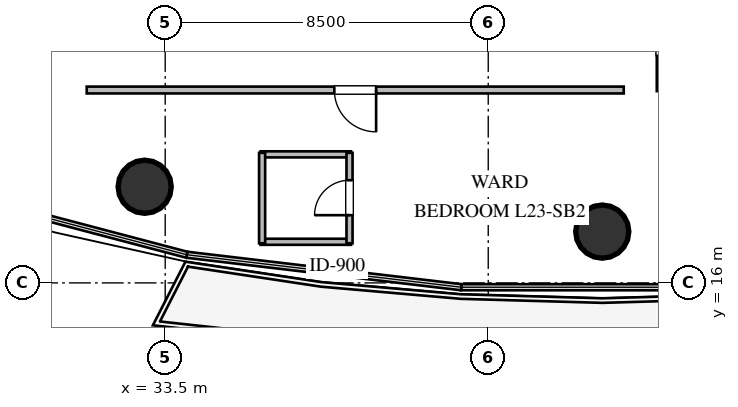
"""IFC4 building model, lengths in metres.
Left out: names, types, materials, properties, quantities, classifications, styles, units other than length and angle.
Written with IfcOpenShell. Run it as: python <this file> out.ifc"""

import sys

from ifc_helpers import new_model, si_unit, direction, frame, frame_2d, origin, origin_2d, place, context, subcontext, project, spatial, rectangle, circle, extrude, element, fill, save


model = new_model("IFC4")
c1 = context("Model", 3, precision=1e-05, world=origin(), true_north=direction((0.0, 1.0)))
c2 = subcontext(c1, "Body", "Model", "MODEL_VIEW")
j1 = project(units=[si_unit("LENGTHUNIT", "METRE"), si_unit("PLANEANGLEUNIT", "RADIAN")], contexts=[c1])
p1 = place(None, origin())
s1 = spatial("IfcSite", under=j1, at=p1, CompositionType="ELEMENT")
p2 = place(p1, origin())
s2 = spatial("IfcBuilding", under=s1, at=p2, CompositionType="ELEMENT")
p3 = place(p2, frame((0.0, 0.0, 88.8)))
s3 = spatial("IfcBuildingStorey", under=s2, at=p3, CompositionType="ELEMENT", Elevation=88.8)
for number, where, z_axis, x_axis in (
    (1, (32.96, 18.53, 0.0), (0.0, 0.0, 1.0), (1.0, 0.0, 0.0)),
    (2, (45.0, 17.35, 0.0), (0.0, 0.0, 1.0), (1.0, 0.0, 0.0)),
):
    element("IfcColumn", number, at=place(p3, frame(where, z_axis=z_axis, x_axis=x_axis)), inside=s3, PredefinedType="COLUMN", context=c2, shape_type="SweptSolid", body=[
        extrude(circle(Radius=0.7, at=origin_2d()), origin(), (0.0, 0.0, 1.0), 3.6),
    ])
for number, where, z_axis, x_axis in (
    (3, (36.01, 17.082, 0.0), (0.0, 0.0, 1.0), (1.0, 0.0, 0.0)),
    (4, (36.01, 19.382, 0.0), (0.0, 0.0, 1.0), (1.0, 0.0, 0.0)),
):
    element("IfcWall", number, at=place(p3, frame(where, z_axis=z_axis, x_axis=x_axis)), inside=s3, PredefinedType="PLUMBINGWALL", context=c2, shape_type="SweptSolid", body=[
        extrude(rectangle(XDim=2.38, YDim=0.16, at=frame_2d((1.19, 0.0))), origin(), (0.0, 0.0, 1.0), 3.28),
    ])
p4 = place(p3, frame((36.05, 17.042, 0.0), z_axis=(0.0, 0.0, 1.0), x_axis=(0.0, 1.0, 0.0)))
e5 = element("IfcWall", 5, at=p4, inside=s3, PredefinedType="PLUMBINGWALL", context=c2, shape_type="SweptSolid", body=[
    extrude(rectangle(XDim=2.38, YDim=0.16, at=frame_2d((1.19, 0.0))), origin(), (0.0, 0.0, 1.0), 3.28),
])
p5 = place(p3, frame((38.35, 17.042, 0.0), z_axis=(0.0, 0.0, 1.0), x_axis=(0.0, 1.0, 0.0)))
e6 = element("IfcWall", 6, at=p5, inside=s3, PredefinedType="PLUMBINGWALL", context=c2, shape_type="SweptSolid", body=[
    extrude(rectangle(XDim=2.38, YDim=0.16, at=frame_2d((1.19, 0.0))), origin(), (0.0, 0.0, 1.0), 3.28),
])
p6 = place(p5, frame((0.74, 0.0, 0.0)))
e7 = element("IfcOpeningElement", 7, at=p6, cuts=e6, PredefinedType="OPENING", context=c2, shape_type="SweptSolid", body=[
    extrude(rectangle(XDim=0.92, YDim=2.1, at=frame_2d((0.46, 1.05))), frame((0.0, 0.09, 0.0), z_axis=(0.0, -1.0, 0.0), x_axis=(1.0, 0.0, 0.0)), (0.0, 0.0, 1.0), 0.18),
])
p7 = place(p3, frame((46.525, 24.105, 0.0), z_axis=(0.0, 0.0, 1.0), x_axis=(0.0, -1.0, 0.0)))
e8 = element("IfcWall", 8, at=p7, inside=s3, PredefinedType="PARTITIONING", context=c2, shape_type="SweptSolid", body=[
    extrude(rectangle(XDim=3.06, YDim=0.18, at=frame_2d((1.53, 0.0))), origin(), (0.0, 0.0, 1.0), 3.28),
])
p8 = place(p7, frame((0.93, 0.0, 0.0)))
e9 = element("IfcOpeningElement", 9, at=p8, cuts=e8, PredefinedType="OPENING", context=c2, shape_type="SweptSolid", body=[
    extrude(rectangle(XDim=1.2, YDim=2.15, at=frame_2d((0.6, 1.075))), frame((0.0, 0.1, 0.0), z_axis=(0.0, -1.0, 0.0), x_axis=(1.0, 0.0, 0.0)), (0.0, 0.0, 1.0), 0.2),
])
p9 = place(p3, frame((45.565, 21.075, 0.0), z_axis=(0.0, 0.0, 1.0), x_axis=(-1.0, 0.0, 0.0)))
e10 = element("IfcWall", 10, at=p9, inside=s3, PredefinedType="PARTITIONING", context=c2, shape_type="SweptSolid", body=[
    extrude(rectangle(XDim=14.13, YDim=0.18, at=frame_2d((7.065, 0.0))), origin(), (0.0, 0.0, 1.0), 2.916),
])
p10 = place(p9, frame((6.515, 0.0, 0.0)))
e11 = element("IfcOpeningElement", 11, at=p10, cuts=e10, PredefinedType="OPENING", context=c2, shape_type="SweptSolid", body=[
    extrude(rectangle(XDim=1.1, YDim=2.1, at=frame_2d((0.55, 1.05))), frame((0.0, 0.1, 0.0), z_axis=(0.0, -1.0, 0.0), x_axis=(1.0, 0.0, 0.0)), (0.0, 0.0, 1.0), 0.2),
])
p11 = place(p6, origin())
e12 = element("IfcDoor", 12, at=p11, inside=s3, OperationType="SINGLE_SWING_LEFT", PredefinedType="DOOR", context=c2, shape_type="SweptSolid", body=[
    extrude(rectangle(XDim=0.92, YDim=2.1, at=frame_2d((0.46, 1.05))), frame((0.0, 0.025, 0.0), z_axis=(0.0, -1.0, 0.0), x_axis=(1.0, 0.0, 0.0)), (0.0, 0.0, 1.0), 0.05),
])
fill(e7, e12)
p12 = place(p10, origin())
e13 = element("IfcDoor", 13, at=p12, inside=s3, OperationType="SINGLE_SWING_LEFT", PredefinedType="DOOR", context=c2, shape_type="SweptSolid", body=[
    extrude(rectangle(XDim=1.1, YDim=2.1, at=frame_2d((0.55, 1.05))), frame((0.0, 0.025, 0.0), z_axis=(0.0, -1.0, 0.0), x_axis=(1.0, 0.0, 0.0)), (0.0, 0.0, 1.0), 0.05),
])
fill(e11, e13)
save(model, sys.argv[1])
